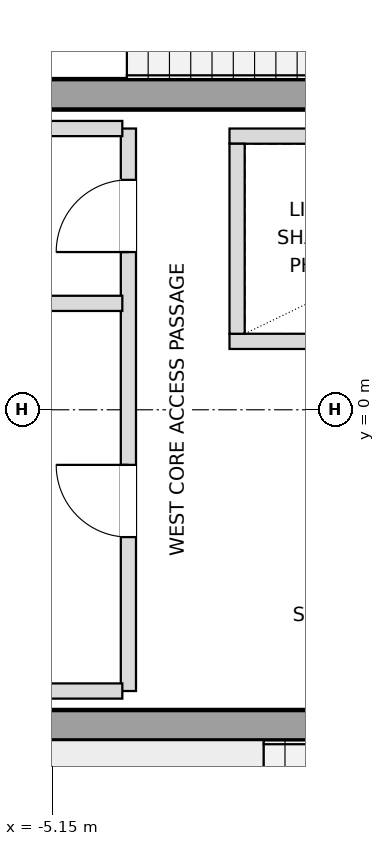
"""IFC4 building model, lengths in metres.
Left out: names, types, materials, properties, quantities, classifications, styles, units other than length and angle.
Written with IfcOpenShell. Run it as: python <this file> out.ifc"""

import sys

from ifc_helpers import new_model, si_unit, direction, frame, frame_2d, origin, place, context, subcontext, project, spatial, rectangle, extrude, element, fill, save


model = new_model("IFC4")
c1 = context("Model", 3, precision=1e-05, world=origin(), true_north=direction((0.0, 1.0)))
c2 = subcontext(c1, "Body", "Model", "MODEL_VIEW")
j1 = project(units=[si_unit("LENGTHUNIT", "METRE"), si_unit("PLANEANGLEUNIT", "RADIAN")], contexts=[c1])
p1 = place(None, origin())
s1 = spatial("IfcSite", under=j1, at=p1, CompositionType="ELEMENT")
p2 = place(p1, origin())
s2 = spatial("IfcBuilding", under=s1, at=p2, CompositionType="ELEMENT")
p3 = place(p2, frame((0.0, 0.0, 133.2)))
s3 = spatial("IfcBuildingStorey", under=s2, at=p3, CompositionType="ELEMENT", Elevation=133.2)
p4 = place(p3, frame((-6.25, -4.15, 0.0), z_axis=(0.0, 0.0, 1.0), x_axis=(1.0, 0.0, 0.0)))
e1 = element("IfcWall", 1, at=p4, inside=s3, PredefinedType="SHEAR", context=c2, shape_type="SweptSolid", body=[
    extrude(rectangle(XDim=7.78, YDim=0.4, at=frame_2d((3.89, 0.0))), origin(), (0.0, 0.0, 1.0), 3.38),
])
p5 = place(p3, frame((-5.55, 4.15, 0.0), z_axis=(0.0, 0.0, 1.0), x_axis=(1.0, 0.0, 0.0)))
e2 = element("IfcWall", 2, at=p5, inside=s3, PredefinedType="SHEAR", context=c2, shape_type="SweptSolid", body=[
    extrude(rectangle(XDim=7.08, YDim=0.4, at=frame_2d((3.54, 0.0))), origin(), (0.0, 0.0, 1.0), 3.38),
])
p6 = place(p3, frame((-2.82, 0.9, 0.0), z_axis=(0.0, 0.0, 1.0), x_axis=(1.0, 0.0, 0.0)))
e3 = element("IfcWall", 3, at=p6, inside=s3, PredefinedType="SOLIDWALL", context=c2, shape_type="SweptSolid", body=[
    extrude(rectangle(XDim=5.58, YDim=0.2, at=frame_2d((2.79, 0.0))), origin(), (0.0, 0.0, 1.0), 3.38),
])
p7 = place(p6, frame((3.86, 0.0, 0.0)))
e4 = element("IfcOpeningElement", 4, at=p7, cuts=e3, PredefinedType="OPENING", context=c2, shape_type="SweptSolid", body=[
    extrude(rectangle(XDim=1.2, YDim=2.2, at=frame_2d((0.6, 1.1))), frame((0.0, 0.11, 0.0), z_axis=(0.0, -1.0, 0.0), x_axis=(1.0, 0.0, 0.0)), (0.0, 0.0, 1.0), 0.22),
])
p8 = place(p3, frame((-2.82, 3.6, 0.0), z_axis=(0.0, 0.0, 1.0), x_axis=(1.0, 0.0, 0.0)))
e5 = element("IfcWall", 5, at=p8, inside=s3, PredefinedType="SOLIDWALL", context=c2, shape_type="SweptSolid", body=[
    extrude(rectangle(XDim=5.58, YDim=0.2, at=frame_2d((2.79, 0.0))), origin(), (0.0, 0.0, 1.0), 3.38),
])
p9 = place(p3, frame((-2.72, 1.0, 0.0), z_axis=(0.0, 0.0, 1.0), x_axis=(0.0, 1.0, 0.0)))
e6 = element("IfcWall", 6, at=p9, inside=s3, PredefinedType="SOLIDWALL", context=c2, shape_type="SweptSolid", body=[
    extrude(rectangle(XDim=2.5, YDim=0.2, at=frame_2d((1.25, 0.0))), origin(), (0.0, 0.0, 1.0), 3.38),
])
p10 = place(p3, frame((-4.15, -3.7, 0.0), z_axis=(0.0, 0.0, 1.0), x_axis=(0.0, 1.0, 0.0)))
e7 = element("IfcWall", 7, at=p10, inside=s3, PredefinedType="SOLIDWALL", context=c2, shape_type="SweptSolid", body=[
    extrude(rectangle(XDim=7.4, YDim=0.2, at=frame_2d((3.7, 0.0))), origin(), (0.0, 0.0, 1.0), 3.38),
])
p11 = place(p10, frame((2.025, 0.0, 0.0)))
e8 = element("IfcOpeningElement", 8, at=p11, cuts=e7, PredefinedType="OPENING", context=c2, shape_type="SweptSolid", body=[
    extrude(rectangle(XDim=0.95, YDim=2.15, at=frame_2d((0.475, 1.075))), frame((0.0, 0.11, 0.0), z_axis=(0.0, -1.0, 0.0), x_axis=(1.0, 0.0, 0.0)), (0.0, 0.0, 1.0), 0.22),
])
p12 = place(p10, frame((5.775, 0.0, 0.0)))
e9 = element("IfcOpeningElement", 9, at=p12, cuts=e7, PredefinedType="OPENING", context=c2, shape_type="SweptSolid", body=[
    extrude(rectangle(XDim=0.95, YDim=2.15, at=frame_2d((0.475, 1.075))), frame((0.0, 0.11, 0.0), z_axis=(0.0, -1.0, 0.0), x_axis=(1.0, 0.0, 0.0)), (0.0, 0.0, 1.0), 0.22),
])
for number, where, z_axis, x_axis in (
    (10, (-6.17, -3.7, 0.0), (0.0, 0.0, 1.0), (1.0, 0.0, 0.0)),
    (11, (-6.17, 1.4, 0.0), (0.0, 0.0, 1.0), (1.0, 0.0, 0.0)),
    (12, (-6.17, 3.7, 0.0), (0.0, 0.0, 1.0), (1.0, 0.0, 0.0)),
):
    element("IfcWall", number, at=place(p3, frame(where, z_axis=z_axis, x_axis=x_axis)), inside=s3, PredefinedType="SOLIDWALL", context=c2, shape_type="SweptSolid", body=[
        extrude(rectangle(XDim=1.94, YDim=0.2, at=frame_2d((0.97, 0.0))), origin(), (0.0, 0.0, 1.0), 3.38),
    ])
p13 = place(p11, origin())
e13 = element("IfcDoor", 13, at=p13, inside=s3, OperationType="SINGLE_SWING_RIGHT", PredefinedType="DOOR", context=c2, shape_type="SweptSolid", body=[
    extrude(rectangle(XDim=0.95, YDim=2.15, at=frame_2d((0.475, 1.075))), frame((0.0, 0.025, 0.0), z_axis=(0.0, -1.0, 0.0), x_axis=(1.0, 0.0, 0.0)), (0.0, 0.0, 1.0), 0.05),
])
fill(e8, e13)
p14 = place(p12, origin())
e14 = element("IfcDoor", 14, at=p14, inside=s3, OperationType="SINGLE_SWING_LEFT", PredefinedType="DOOR", context=c2, shape_type="SweptSolid", body=[
    extrude(rectangle(XDim=0.95, YDim=2.15, at=frame_2d((0.475, 1.075))), frame((0.0, 0.025, 0.0), z_axis=(0.0, -1.0, 0.0), x_axis=(1.0, 0.0, 0.0)), (0.0, 0.0, 1.0), 0.05),
])
fill(e9, e14)
save(model, sys.argv[1])
